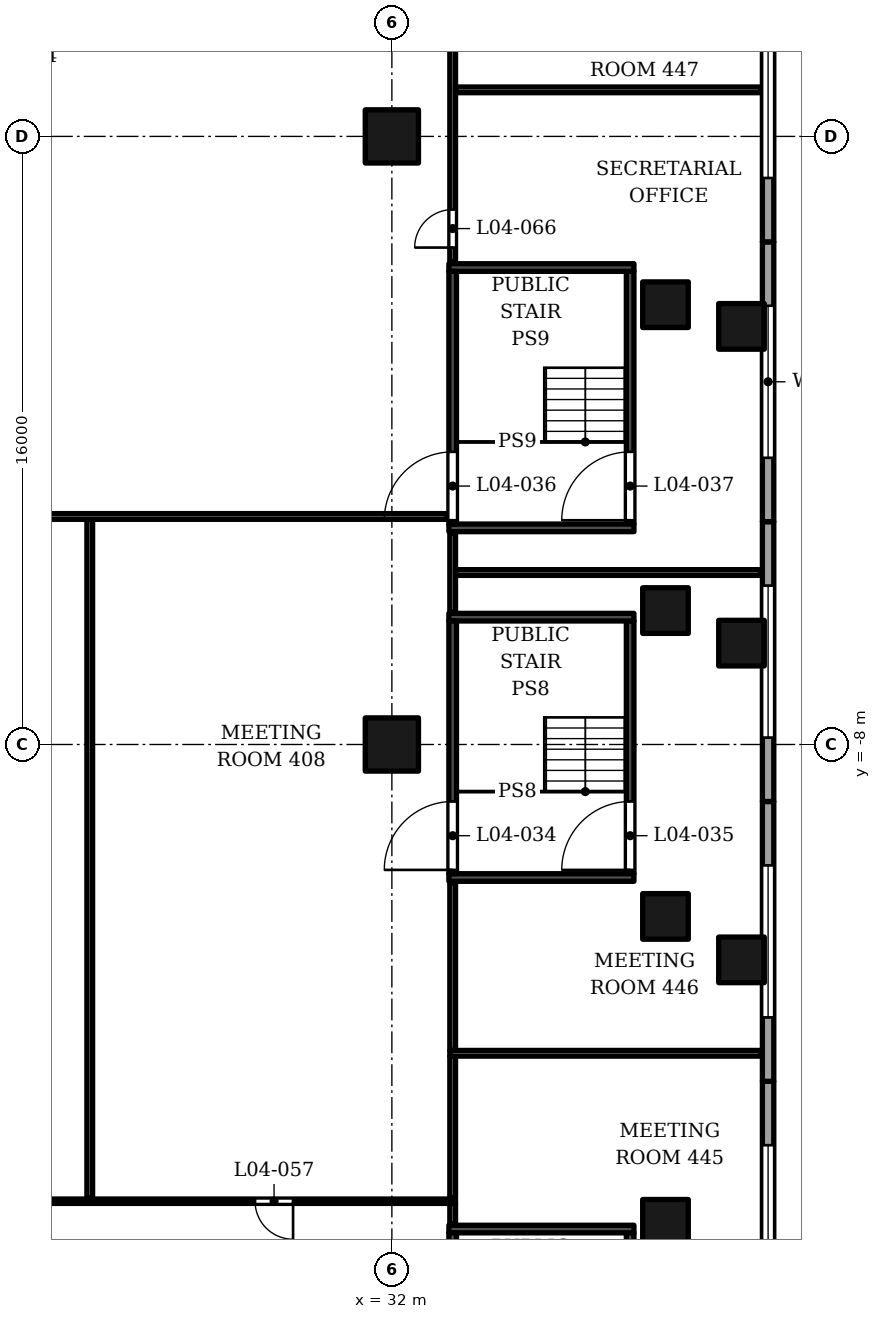
"""IFC4 building model, lengths in metres.
Left out: names, types, materials, properties, quantities, classifications, styles, units other than length and angle.
Written with IfcOpenShell. Run it as: python <this file> out.ifc"""

import sys

from ifc_helpers import new_model, si_unit, direction, frame, frame_2d, origin, origin_2d, place, context, subcontext, project, spatial, rectangle, extrude, element, fill, save


model = new_model("IFC4")
c1 = context("Model", 3, precision=1e-05, world=origin(), true_north=direction((0.0, 1.0)))
c2 = subcontext(c1, "Body", "Model", "MODEL_VIEW")
j1 = project(units=[si_unit("LENGTHUNIT", "METRE"), si_unit("PLANEANGLEUNIT", "RADIAN")], contexts=[c1])
p1 = place(None, origin())
s1 = spatial("IfcSite", under=j1, at=p1, CompositionType="ELEMENT")
p2 = place(p1, origin())
s2 = spatial("IfcBuilding", under=s1, at=p2, CompositionType="ELEMENT")
p3 = place(p2, frame((0.0, 0.0, 34.5)))
s3 = spatial("IfcBuildingStorey", under=s2, at=p3, CompositionType="ELEMENT", Elevation=34.5)
for number, where, z_axis, x_axis in (
    (1, (32.0, -8.0, 0.0), (0.0, 0.0, 1.0), (1.0, 0.0, 0.0)),
    (2, (32.0, 8.0, 0.0), (0.0, 0.0, 1.0), (1.0, 0.0, 0.0)),
):
    element("IfcColumn", number, at=place(p3, frame(where, z_axis=z_axis, x_axis=x_axis)), inside=s3, PredefinedType="COLUMN", context=c2, shape_type="SweptSolid", body=[
        extrude(rectangle(XDim=1.4, YDim=1.4, at=origin_2d()), origin(), (0.0, 0.0, 1.0), 5.5),
    ])
for number, where, z_axis, x_axis in (
    (3, (39.2, 3.572, 0.0), (0.0, 0.0, 1.0), (1.0, 0.0, 0.0)),
    (4, (39.2, -4.476, 0.0), (0.0, 0.0, 1.0), (1.0, 0.0, 0.0)),
    (5, (39.2, -12.524, 0.0), (0.0, 0.0, 1.0), (1.0, 0.0, 0.0)),
    (6, (39.2, -20.572, 0.0), (0.0, 0.0, 1.0), (1.0, 0.0, 0.0)),
    (7, (41.2, 3.001, 0.0), (0.0, 0.0, 1.0), (1.0, 0.0, 0.0)),
    (8, (41.2, -5.333, 0.0), (0.0, 0.0, 1.0), (1.0, 0.0, 0.0)),
    (9, (41.2, -13.667, 0.0), (0.0, 0.0, 1.0), (1.0, 0.0, 0.0)),
):
    element("IfcColumn", number, at=place(p3, frame(where, z_axis=z_axis, x_axis=x_axis)), inside=s3, PredefinedType="COLUMN", context=c2, shape_type="SweptSolid", body=[
        extrude(rectangle(XDim=1.2, YDim=1.2, at=origin_2d()), origin(), (0.0, 0.0, 1.0), 5.5),
    ])
p4 = place(p3, frame((41.9, -24.225, 0.0), z_axis=(0.0, 0.0, 1.0), x_axis=(0.0, 1.0, 0.0)))
e10 = element("IfcWall", 10, at=p4, inside=s3, PredefinedType="SOLIDWALL", context=c2, shape_type="SweptSolid", body=[
    extrude(rectangle(XDim=7.363, YDim=0.3, at=frame_2d((3.681, 0.0))), origin(), (0.0, 0.0, 1.0), 4.1),
])
p5 = place(p4, frame((1.681, 0.0, 1.0)))
e11 = element("IfcOpeningElement", 11, at=p5, cuts=e10, PredefinedType="OPENING", context=c2, shape_type="SweptSolid", body=[
    extrude(rectangle(XDim=4.0, YDim=1.8, at=frame_2d((2.0, 0.9))), frame((0.0, 0.16, 0.0), z_axis=(0.0, -1.0, 0.0), x_axis=(1.0, 0.0, 0.0)), (0.0, 0.0, 1.0), 0.32),
])
p6 = place(p3, frame((41.9, -16.863, 0.0), z_axis=(0.0, 0.0, 1.0), x_axis=(0.0, 1.0, 0.0)))
e12 = element("IfcWall", 12, at=p6, inside=s3, PredefinedType="SOLIDWALL", context=c2, shape_type="SweptSolid", body=[
    extrude(rectangle(XDim=7.363, YDim=0.3, at=frame_2d((3.681, 0.0))), origin(), (0.0, 0.0, 1.0), 4.1),
])
p7 = place(p6, frame((1.681, 0.0, 1.0)))
e13 = element("IfcOpeningElement", 13, at=p7, cuts=e12, PredefinedType="OPENING", context=c2, shape_type="SweptSolid", body=[
    extrude(rectangle(XDim=4.0, YDim=1.8, at=frame_2d((2.0, 0.9))), frame((0.0, 0.16, 0.0), z_axis=(0.0, -1.0, 0.0), x_axis=(1.0, 0.0, 0.0)), (0.0, 0.0, 1.0), 0.32),
])
p8 = place(p3, frame((41.9, -9.5, 0.0), z_axis=(0.0, 0.0, 1.0), x_axis=(0.0, 1.0, 0.0)))
e14 = element("IfcWall", 14, at=p8, inside=s3, PredefinedType="SOLIDWALL", context=c2, shape_type="SweptSolid", body=[
    extrude(rectangle(XDim=7.363, YDim=0.3, at=frame_2d((3.681, 0.0))), origin(), (0.0, 0.0, 1.0), 4.1),
])
p9 = place(p8, frame((1.681, 0.0, 1.0)))
e15 = element("IfcOpeningElement", 15, at=p9, cuts=e14, PredefinedType="OPENING", context=c2, shape_type="SweptSolid", body=[
    extrude(rectangle(XDim=4.0, YDim=1.8, at=frame_2d((2.0, 0.9))), frame((0.0, 0.16, 0.0), z_axis=(0.0, -1.0, 0.0), x_axis=(1.0, 0.0, 0.0)), (0.0, 0.0, 1.0), 0.32),
])
p10 = place(p3, frame((41.9, -2.137, 0.0), z_axis=(0.0, 0.0, 1.0), x_axis=(0.0, 1.0, 0.0)))
e16 = element("IfcWall", 16, at=p10, inside=s3, PredefinedType="SOLIDWALL", context=c2, shape_type="SweptSolid", body=[
    extrude(rectangle(XDim=7.363, YDim=0.3, at=frame_2d((3.681, 0.0))), origin(), (0.0, 0.0, 1.0), 4.1),
])
p11 = place(p10, frame((1.681, 0.0, 1.0)))
e17 = element("IfcOpeningElement", 17, at=p11, cuts=e16, PredefinedType="OPENING", context=c2, shape_type="SweptSolid", body=[
    extrude(rectangle(XDim=4.0, YDim=1.8, at=frame_2d((2.0, 0.9))), frame((0.0, 0.16, 0.0), z_axis=(0.0, -1.0, 0.0), x_axis=(1.0, 0.0, 0.0)), (0.0, 0.0, 1.0), 0.32),
])
p12 = place(p3, frame((41.9, 5.225, 0.0), z_axis=(0.0, 0.0, 1.0), x_axis=(0.0, 1.0, 0.0)))
e18 = element("IfcWall", 18, at=p12, inside=s3, PredefinedType="SOLIDWALL", context=c2, shape_type="SweptSolid", body=[
    extrude(rectangle(XDim=7.362, YDim=0.3, at=frame_2d((3.681, 0.0))), origin(), (0.0, 0.0, 1.0), 4.1),
])
p13 = place(p12, frame((1.681, 0.0, 1.0)))
e19 = element("IfcOpeningElement", 19, at=p13, cuts=e18, PredefinedType="OPENING", context=c2, shape_type="SweptSolid", body=[
    extrude(rectangle(XDim=4.0, YDim=1.8, at=frame_2d((2.0, 0.9))), frame((0.0, 0.16, 0.0), z_axis=(0.0, -1.0, 0.0), x_axis=(1.0, 0.0, 0.0)), (0.0, 0.0, 1.0), 0.32),
])
for number, where, z_axis, x_axis in (
    (20, (41.85, -24.093, 5.5), (0.0, 0.0, 1.0), (0.0, 1.0, 0.0)),
    (21, (41.85, -9.395, 5.5), (0.0, 0.0, 1.0), (0.0, 1.0, 0.0)),
    (22, (41.85, 5.302, 5.5), (0.0, 0.0, 1.0), (0.0, 1.0, 0.0)),
):
    element("IfcWall", number, at=place(p3, frame(where, z_axis=z_axis, x_axis=x_axis)), inside=s3, PredefinedType="PARAPET", context=c2, shape_type="SweptSolid", body=[
        extrude(rectangle(XDim=14.698, YDim=0.3, at=frame_2d((7.349, 0.0))), origin(), (0.0, 0.0, 1.0), 1.1),
    ])
p14 = place(p3, frame((33.5, -20.75, 0.0), z_axis=(0.0, 0.0, 1.0), x_axis=(1.0, 0.0, 0.0)))
e23 = element("IfcWall", 23, at=p14, inside=s3, PredefinedType="SOLIDWALL", context=c2, shape_type="SweptSolid", body=[
    extrude(rectangle(XDim=4.87, YDim=0.2, at=frame_2d((2.435, 0.0))), origin(), (0.0, 0.0, 1.0), 5.05),
])
p15 = place(p3, frame((33.6, -27.5, 0.0), z_axis=(0.0, 0.0, 1.0), x_axis=(0.0, 1.0, 0.0)))
e24 = element("IfcWall", 24, at=p15, inside=s3, PredefinedType="SOLIDWALL", context=c2, shape_type="SweptSolid", body=[
    extrude(rectangle(XDim=6.65, YDim=0.2, at=frame_2d((3.325, 0.0))), origin(), (0.0, 0.0, 1.0), 5.05),
])
p16 = place(p15, frame((0.1, 0.0, 0.0)))
e25 = element("IfcOpeningElement", 25, at=p16, cuts=e24, PredefinedType="OPENING", context=c2, shape_type="SweptSolid", body=[
    extrude(rectangle(XDim=1.8, YDim=2.4, at=frame_2d((0.9, 1.2))), frame((0.0, 0.11, 0.0), z_axis=(0.0, -1.0, 0.0), x_axis=(1.0, 0.0, 0.0)), (0.0, 0.0, 1.0), 0.22),
])
p17 = place(p3, frame((38.27, -27.5, 0.0), z_axis=(0.0, 0.0, 1.0), x_axis=(0.0, 1.0, 0.0)))
e26 = element("IfcWall", 26, at=p17, inside=s3, PredefinedType="SOLIDWALL", context=c2, shape_type="SweptSolid", body=[
    extrude(rectangle(XDim=6.65, YDim=0.2, at=frame_2d((3.325, 0.0))), origin(), (0.0, 0.0, 1.0), 5.05),
])
p18 = place(p17, frame((0.1, 0.0, 0.0)))
e27 = element("IfcOpeningElement", 27, at=p18, cuts=e26, PredefinedType="OPENING", context=c2, shape_type="SweptSolid", body=[
    extrude(rectangle(XDim=1.8, YDim=2.4, at=frame_2d((0.9, 1.2))), frame((0.0, 0.11, 0.0), z_axis=(0.0, -1.0, 0.0), x_axis=(1.0, 0.0, 0.0)), (0.0, 0.0, 1.0), 0.22),
])
for number, where, z_axis, x_axis in (
    (28, (33.5, -11.5, 0.0), (0.0, 0.0, 1.0), (1.0, 0.0, 0.0)),
    (29, (33.5, -4.65, 0.0), (0.0, 0.0, 1.0), (1.0, 0.0, 0.0)),
):
    element("IfcWall", number, at=place(p3, frame(where, z_axis=z_axis, x_axis=x_axis)), inside=s3, PredefinedType="SOLIDWALL", context=c2, shape_type="SweptSolid", body=[
        extrude(rectangle(XDim=4.87, YDim=0.2, at=frame_2d((2.435, 0.0))), origin(), (0.0, 0.0, 1.0), 5.05),
    ])
p19 = place(p3, frame((33.6, -11.4, 0.0), z_axis=(0.0, 0.0, 1.0), x_axis=(0.0, 1.0, 0.0)))
e30 = element("IfcWall", 30, at=p19, inside=s3, PredefinedType="SOLIDWALL", context=c2, shape_type="SweptSolid", body=[
    extrude(rectangle(XDim=6.65, YDim=0.2, at=frame_2d((3.325, 0.0))), origin(), (0.0, 0.0, 1.0), 5.05),
])
p20 = place(p19, frame((0.1, 0.0, 0.0)))
e31 = element("IfcOpeningElement", 31, at=p20, cuts=e30, PredefinedType="OPENING", context=c2, shape_type="SweptSolid", body=[
    extrude(rectangle(XDim=1.8, YDim=2.4, at=frame_2d((0.9, 1.2))), frame((0.0, 0.11, 0.0), z_axis=(0.0, -1.0, 0.0), x_axis=(1.0, 0.0, 0.0)), (0.0, 0.0, 1.0), 0.22),
])
p21 = place(p3, frame((38.27, -11.4, 0.0), z_axis=(0.0, 0.0, 1.0), x_axis=(0.0, 1.0, 0.0)))
e32 = element("IfcWall", 32, at=p21, inside=s3, PredefinedType="SOLIDWALL", context=c2, shape_type="SweptSolid", body=[
    extrude(rectangle(XDim=6.65, YDim=0.2, at=frame_2d((3.325, 0.0))), origin(), (0.0, 0.0, 1.0), 5.05),
])
p22 = place(p21, frame((0.1, 0.0, 0.0)))
e33 = element("IfcOpeningElement", 33, at=p22, cuts=e32, PredefinedType="OPENING", context=c2, shape_type="SweptSolid", body=[
    extrude(rectangle(XDim=1.8, YDim=2.4, at=frame_2d((0.9, 1.2))), frame((0.0, 0.11, 0.0), z_axis=(0.0, -1.0, 0.0), x_axis=(1.0, 0.0, 0.0)), (0.0, 0.0, 1.0), 0.22),
])
for number, where, z_axis, x_axis in (
    (34, (33.5, -2.3, 0.0), (0.0, 0.0, 1.0), (1.0, 0.0, 0.0)),
    (35, (33.5, 4.55, 0.0), (0.0, 0.0, 1.0), (1.0, 0.0, 0.0)),
):
    element("IfcWall", number, at=place(p3, frame(where, z_axis=z_axis, x_axis=x_axis)), inside=s3, PredefinedType="SOLIDWALL", context=c2, shape_type="SweptSolid", body=[
        extrude(rectangle(XDim=4.87, YDim=0.2, at=frame_2d((2.435, 0.0))), origin(), (0.0, 0.0, 1.0), 5.05),
    ])
p23 = place(p3, frame((33.6, -2.2, 0.0), z_axis=(0.0, 0.0, 1.0), x_axis=(0.0, 1.0, 0.0)))
e36 = element("IfcWall", 36, at=p23, inside=s3, PredefinedType="SOLIDWALL", context=c2, shape_type="SweptSolid", body=[
    extrude(rectangle(XDim=6.65, YDim=0.2, at=frame_2d((3.325, 0.0))), origin(), (0.0, 0.0, 1.0), 5.05),
])
p24 = place(p23, frame((0.1, 0.0, 0.0)))
e37 = element("IfcOpeningElement", 37, at=p24, cuts=e36, PredefinedType="OPENING", context=c2, shape_type="SweptSolid", body=[
    extrude(rectangle(XDim=1.8, YDim=2.4, at=frame_2d((0.9, 1.2))), frame((0.0, 0.11, 0.0), z_axis=(0.0, -1.0, 0.0), x_axis=(1.0, 0.0, 0.0)), (0.0, 0.0, 1.0), 0.22),
])
p25 = place(p3, frame((38.27, -2.2, 0.0), z_axis=(0.0, 0.0, 1.0), x_axis=(0.0, 1.0, 0.0)))
e38 = element("IfcWall", 38, at=p25, inside=s3, PredefinedType="SOLIDWALL", context=c2, shape_type="SweptSolid", body=[
    extrude(rectangle(XDim=6.65, YDim=0.2, at=frame_2d((3.325, 0.0))), origin(), (0.0, 0.0, 1.0), 5.05),
])
p26 = place(p25, frame((0.1, 0.0, 0.0)))
e39 = element("IfcOpeningElement", 39, at=p26, cuts=e38, PredefinedType="OPENING", context=c2, shape_type="SweptSolid", body=[
    extrude(rectangle(XDim=1.8, YDim=2.4, at=frame_2d((0.9, 1.2))), frame((0.0, 0.11, 0.0), z_axis=(0.0, -1.0, 0.0), x_axis=(1.0, 0.0, 0.0)), (0.0, 0.0, 1.0), 0.22),
])
p27 = place(p3, frame((33.6, -20.61, 0.0), z_axis=(0.0, 0.0, 1.0), x_axis=(0.0, 1.0, 0.0)))
e40 = element("IfcWall", 40, at=p27, inside=s3, PredefinedType="PARTITIONING", context=c2, shape_type="SweptSolid", body=[
    extrude(rectangle(XDim=0.535, YDim=0.15, at=frame_2d((0.268, 0.0))), origin(), (0.0, 0.0, 1.0), 5.05),
])
p28 = place(p3, frame((14.77, -20.018, 0.0), z_axis=(0.0, 0.0, 1.0), x_axis=(1.0, 0.0, 0.0)))
e41 = element("IfcWall", 41, at=p28, inside=s3, PredefinedType="PARTITIONING", context=c2, shape_type="SweptSolid", body=[
    extrude(rectangle(XDim=18.905, YDim=0.115, at=frame_2d((9.453, 0.0))), origin(), (0.0, 0.0, 1.0), 3.85),
])
p29 = place(p28, frame((13.63, 0.0, 0.0)))
e42 = element("IfcOpeningElement", 42, at=p29, cuts=e41, PredefinedType="OPENING", context=c2, shape_type="SweptSolid", body=[
    extrude(rectangle(XDim=1.0, YDim=2.1, at=frame_2d((0.5, 1.05))), frame((0.0, 0.067, 0.0), z_axis=(0.0, -1.0, 0.0), x_axis=(1.0, 0.0, 0.0)), (0.0, 0.0, 1.0), 0.135),
])
p30 = place(p3, frame((24.05, -19.925, 0.0), z_axis=(0.0, 0.0, 1.0), x_axis=(0.0, 1.0, 0.0)))
e43 = element("IfcWall", 43, at=p30, inside=s3, PredefinedType="PARTITIONING", context=c2, shape_type="SweptSolid", body=[
    extrude(rectangle(XDim=17.85, YDim=0.15, at=frame_2d((8.925, 0.0))), origin(), (0.0, 0.0, 1.0), 3.85),
])
p31 = place(p3, frame((33.6, -19.925, 0.0), z_axis=(0.0, 0.0, 1.0), x_axis=(0.0, 1.0, 0.0)))
e44 = element("IfcWall", 44, at=p31, inside=s3, PredefinedType="PARTITIONING", context=c2, shape_type="SweptSolid", body=[
    extrude(rectangle(XDim=3.725, YDim=0.15, at=frame_2d((1.863, 0.0))), origin(), (0.0, 0.0, 1.0), 5.05),
])
p32 = place(p3, frame((33.525, -16.125, 0.0), z_axis=(0.0, 0.0, 1.0), x_axis=(1.0, 0.0, 0.0)))
e45 = element("IfcWall", 45, at=p32, inside=s3, PredefinedType="PARTITIONING", context=c2, shape_type="SweptSolid", body=[
    extrude(rectangle(XDim=8.195, YDim=0.15, at=frame_2d((4.098, 0.0))), origin(), (0.0, 0.0, 1.0), 4.15),
])
p33 = place(p3, frame((33.6, -16.05, 0.0), z_axis=(0.0, 0.0, 1.0), x_axis=(0.0, 1.0, 0.0)))
e46 = element("IfcWall", 46, at=p33, inside=s3, PredefinedType="PARTITIONING", context=c2, shape_type="SweptSolid", body=[
    extrude(rectangle(XDim=4.41, YDim=0.15, at=frame_2d((2.205, 0.0))), origin(), (0.0, 0.0, 1.0), 5.05),
])
p34 = place(p3, frame((33.6, -4.51, 0.0), z_axis=(0.0, 0.0, 1.0), x_axis=(0.0, 1.0, 0.0)))
e47 = element("IfcWall", 47, at=p34, inside=s3, PredefinedType="PARTITIONING", context=c2, shape_type="SweptSolid", body=[
    extrude(rectangle(XDim=2.07, YDim=0.15, at=frame_2d((1.035, 0.0))), origin(), (0.0, 0.0, 1.0), 5.05),
])
p35 = place(p3, frame((33.675, -3.475, 0.0), z_axis=(0.0, 0.0, 1.0), x_axis=(1.0, 0.0, 0.0)))
e48 = element("IfcWall", 48, at=p35, inside=s3, PredefinedType="PARTITIONING", context=c2, shape_type="SweptSolid", body=[
    extrude(rectangle(XDim=8.045, YDim=0.15, at=frame_2d((4.022, 0.0))), origin(), (0.0, 0.0, 1.0), 4.15),
])
p36 = place(p3, frame((-33.46, -2.0, 0.0), z_axis=(0.0, 0.0, 1.0), x_axis=(1.0, 0.0, 0.0)))
e49 = element("IfcWall", 49, at=p36, inside=s3, PredefinedType="PARTITIONING", context=c2, shape_type="SweptSolid", body=[
    extrude(rectangle(XDim=66.92, YDim=0.15, at=frame_2d((33.46, 0.0))), origin(), (0.0, 0.0, 1.0), 3.85),
])
p37 = place(p36, frame((19.91, 0.0, 0.0)))
e50 = element("IfcOpeningElement", 50, at=p37, cuts=e49, PredefinedType="OPENING", context=c2, shape_type="SweptSolid", body=[
    extrude(rectangle(XDim=1.2, YDim=2.1, at=frame_2d((0.6, 1.05))), frame((0.0, 0.085, 0.0), z_axis=(0.0, -1.0, 0.0), x_axis=(1.0, 0.0, 0.0)), (0.0, 0.0, 1.0), 0.17),
])
p38 = place(p36, frame((45.91, 0.0, 0.0)))
e51 = element("IfcOpeningElement", 51, at=p38, cuts=e49, PredefinedType="OPENING", context=c2, shape_type="SweptSolid", body=[
    extrude(rectangle(XDim=1.2, YDim=2.1, at=frame_2d((0.6, 1.05))), frame((0.0, 0.085, 0.0), z_axis=(0.0, -1.0, 0.0), x_axis=(1.0, 0.0, 0.0)), (0.0, 0.0, 1.0), 0.17),
])
p39 = place(p36, frame((30.11, 0.0, 0.0)))
e52 = element("IfcOpeningElement", 52, at=p39, cuts=e49, PredefinedType="OPENING", context=c2, shape_type="SweptSolid", body=[
    extrude(rectangle(XDim=1.0, YDim=2.1, at=frame_2d((0.5, 1.05))), frame((0.0, 0.085, 0.0), z_axis=(0.0, -1.0, 0.0), x_axis=(1.0, 0.0, 0.0)), (0.0, 0.0, 1.0), 0.17),
])
p40 = place(p36, frame((35.86, 0.0, 0.0)))
e53 = element("IfcOpeningElement", 53, at=p40, cuts=e49, PredefinedType="OPENING", context=c2, shape_type="SweptSolid", body=[
    extrude(rectangle(XDim=1.0, YDim=2.1, at=frame_2d((0.5, 1.05))), frame((0.0, 0.085, 0.0), z_axis=(0.0, -1.0, 0.0), x_axis=(1.0, 0.0, 0.0)), (0.0, 0.0, 1.0), 0.17),
])
p41 = place(p3, frame((33.6, 4.69, 0.0), z_axis=(0.0, 0.0, 1.0), x_axis=(0.0, 1.0, 0.0)))
e54 = element("IfcWall", 54, at=p41, inside=s3, PredefinedType="PARTITIONING", context=c2, shape_type="SweptSolid", body=[
    extrude(rectangle(XDim=9.07, YDim=0.15, at=frame_2d((4.535, 0.0))), origin(), (0.0, 0.0, 1.0), 3.85),
])
p42 = place(p41, frame((0.385, 0.0, 0.0)))
e55 = element("IfcOpeningElement", 55, at=p42, cuts=e54, PredefinedType="OPENING", context=c2, shape_type="SweptSolid", body=[
    extrude(rectangle(XDim=1.0, YDim=2.1, at=frame_2d((0.5, 1.05))), frame((0.0, 0.085, 0.0), z_axis=(0.0, -1.0, 0.0), x_axis=(1.0, 0.0, 0.0)), (0.0, 0.0, 1.0), 0.17),
])
p43 = place(p41, frame((5.859, 0.0, 0.0)))
e56 = element("IfcOpeningElement", 56, at=p43, cuts=e54, PredefinedType="OPENING", context=c2, shape_type="SweptSolid", body=[
    extrude(rectangle(XDim=1.0, YDim=2.1, at=frame_2d((0.5, 1.05))), frame((0.0, 0.085, 0.0), z_axis=(0.0, -1.0, 0.0), x_axis=(1.0, 0.0, 0.0)), (0.0, 0.0, 1.0), 0.17),
])
p44 = place(p3, frame((33.675, 9.225, 0.0), z_axis=(0.0, 0.0, 1.0), x_axis=(1.0, 0.0, 0.0)))
e57 = element("IfcWall", 57, at=p44, inside=s3, PredefinedType="PARTITIONING", context=c2, shape_type="SweptSolid", body=[
    extrude(rectangle(XDim=8.045, YDim=0.15, at=frame_2d((4.022, 0.0))), origin(), (0.0, 0.0, 1.0), 4.15),
])
p45 = place(p5, origin())
e58 = element("IfcWindow", 58, at=p45, inside=s3, PartitioningType="SINGLE_PANEL", PredefinedType="WINDOW", context=c2, shape_type="SweptSolid", body=[
    extrude(rectangle(XDim=4.0, YDim=1.8, at=frame_2d((2.0, 0.9))), frame((0.0, 0.03, 0.0), z_axis=(0.0, -1.0, 0.0), x_axis=(1.0, 0.0, 0.0)), (0.0, 0.0, 1.0), 0.06),
])
fill(e11, e58)
p46 = place(p7, origin())
e59 = element("IfcWindow", 59, at=p46, inside=s3, PartitioningType="SINGLE_PANEL", PredefinedType="WINDOW", context=c2, shape_type="SweptSolid", body=[
    extrude(rectangle(XDim=4.0, YDim=1.8, at=frame_2d((2.0, 0.9))), frame((0.0, 0.03, 0.0), z_axis=(0.0, -1.0, 0.0), x_axis=(1.0, 0.0, 0.0)), (0.0, 0.0, 1.0), 0.06),
])
fill(e13, e59)
p47 = place(p9, origin())
e60 = element("IfcWindow", 60, at=p47, inside=s3, PartitioningType="SINGLE_PANEL", PredefinedType="WINDOW", context=c2, shape_type="SweptSolid", body=[
    extrude(rectangle(XDim=4.0, YDim=1.8, at=frame_2d((2.0, 0.9))), frame((0.0, 0.03, 0.0), z_axis=(0.0, -1.0, 0.0), x_axis=(1.0, 0.0, 0.0)), (0.0, 0.0, 1.0), 0.06),
])
fill(e15, e60)
p48 = place(p11, origin())
e61 = element("IfcWindow", 61, at=p48, inside=s3, PartitioningType="SINGLE_PANEL", PredefinedType="WINDOW", context=c2, shape_type="SweptSolid", body=[
    extrude(rectangle(XDim=4.0, YDim=1.8, at=frame_2d((2.0, 0.9))), frame((0.0, 0.03, 0.0), z_axis=(0.0, -1.0, 0.0), x_axis=(1.0, 0.0, 0.0)), (0.0, 0.0, 1.0), 0.06),
])
fill(e17, e61)
p49 = place(p13, origin())
e62 = element("IfcWindow", 62, at=p49, inside=s3, PartitioningType="SINGLE_PANEL", PredefinedType="WINDOW", context=c2, shape_type="SweptSolid", body=[
    extrude(rectangle(XDim=4.0, YDim=1.8, at=frame_2d((2.0, 0.9))), frame((0.0, 0.03, 0.0), z_axis=(0.0, -1.0, 0.0), x_axis=(1.0, 0.0, 0.0)), (0.0, 0.0, 1.0), 0.06),
])
fill(e19, e62)
p50 = place(p20, origin())
e63 = element("IfcDoor", 63, at=p50, inside=s3, OperationType="DOUBLE_DOOR_SINGLE_SWING", PredefinedType="DOOR", context=c2, shape_type="SweptSolid", body=[
    extrude(rectangle(XDim=1.8, YDim=2.4, at=frame_2d((0.9, 1.2))), frame((0.0, 0.025, 0.0), z_axis=(0.0, -1.0, 0.0), x_axis=(1.0, 0.0, 0.0)), (0.0, 0.0, 1.0), 0.05),
])
fill(e31, e63)
p51 = place(p22, origin())
e64 = element("IfcDoor", 64, at=p51, inside=s3, OperationType="DOUBLE_DOOR_SINGLE_SWING", PredefinedType="DOOR", context=c2, shape_type="SweptSolid", body=[
    extrude(rectangle(XDim=1.8, YDim=2.4, at=frame_2d((0.9, 1.2))), frame((0.0, 0.025, 0.0), z_axis=(0.0, -1.0, 0.0), x_axis=(1.0, 0.0, 0.0)), (0.0, 0.0, 1.0), 0.05),
])
fill(e33, e64)
p52 = place(p24, origin())
e65 = element("IfcDoor", 65, at=p52, inside=s3, OperationType="DOUBLE_DOOR_SINGLE_SWING", PredefinedType="DOOR", context=c2, shape_type="SweptSolid", body=[
    extrude(rectangle(XDim=1.8, YDim=2.4, at=frame_2d((0.9, 1.2))), frame((0.0, 0.025, 0.0), z_axis=(0.0, -1.0, 0.0), x_axis=(1.0, 0.0, 0.0)), (0.0, 0.0, 1.0), 0.05),
])
fill(e37, e65)
p53 = place(p26, origin())
e66 = element("IfcDoor", 66, at=p53, inside=s3, OperationType="DOUBLE_DOOR_SINGLE_SWING", PredefinedType="DOOR", context=c2, shape_type="SweptSolid", body=[
    extrude(rectangle(XDim=1.8, YDim=2.4, at=frame_2d((0.9, 1.2))), frame((0.0, 0.025, 0.0), z_axis=(0.0, -1.0, 0.0), x_axis=(1.0, 0.0, 0.0)), (0.0, 0.0, 1.0), 0.05),
])
fill(e39, e66)
p54 = place(p29, origin())
e67 = element("IfcDoor", 67, at=p54, inside=s3, OperationType="SINGLE_SWING_RIGHT", PredefinedType="DOOR", context=c2, shape_type="SweptSolid", body=[
    extrude(rectangle(XDim=1.0, YDim=2.1, at=frame_2d((0.5, 1.05))), frame((0.0, 0.025, 0.0), z_axis=(0.0, -1.0, 0.0), x_axis=(1.0, 0.0, 0.0)), (0.0, 0.0, 1.0), 0.05),
])
fill(e42, e67)
p55 = place(p42, origin())
e68 = element("IfcDoor", 68, at=p55, inside=s3, OperationType="SINGLE_SWING_LEFT", PredefinedType="DOOR", context=c2, shape_type="SweptSolid", body=[
    extrude(rectangle(XDim=1.0, YDim=2.1, at=frame_2d((0.5, 1.05))), frame((0.0, 0.025, 0.0), z_axis=(0.0, -1.0, 0.0), x_axis=(1.0, 0.0, 0.0)), (0.0, 0.0, 1.0), 0.05),
])
fill(e55, e68)
save(model, sys.argv[1])
